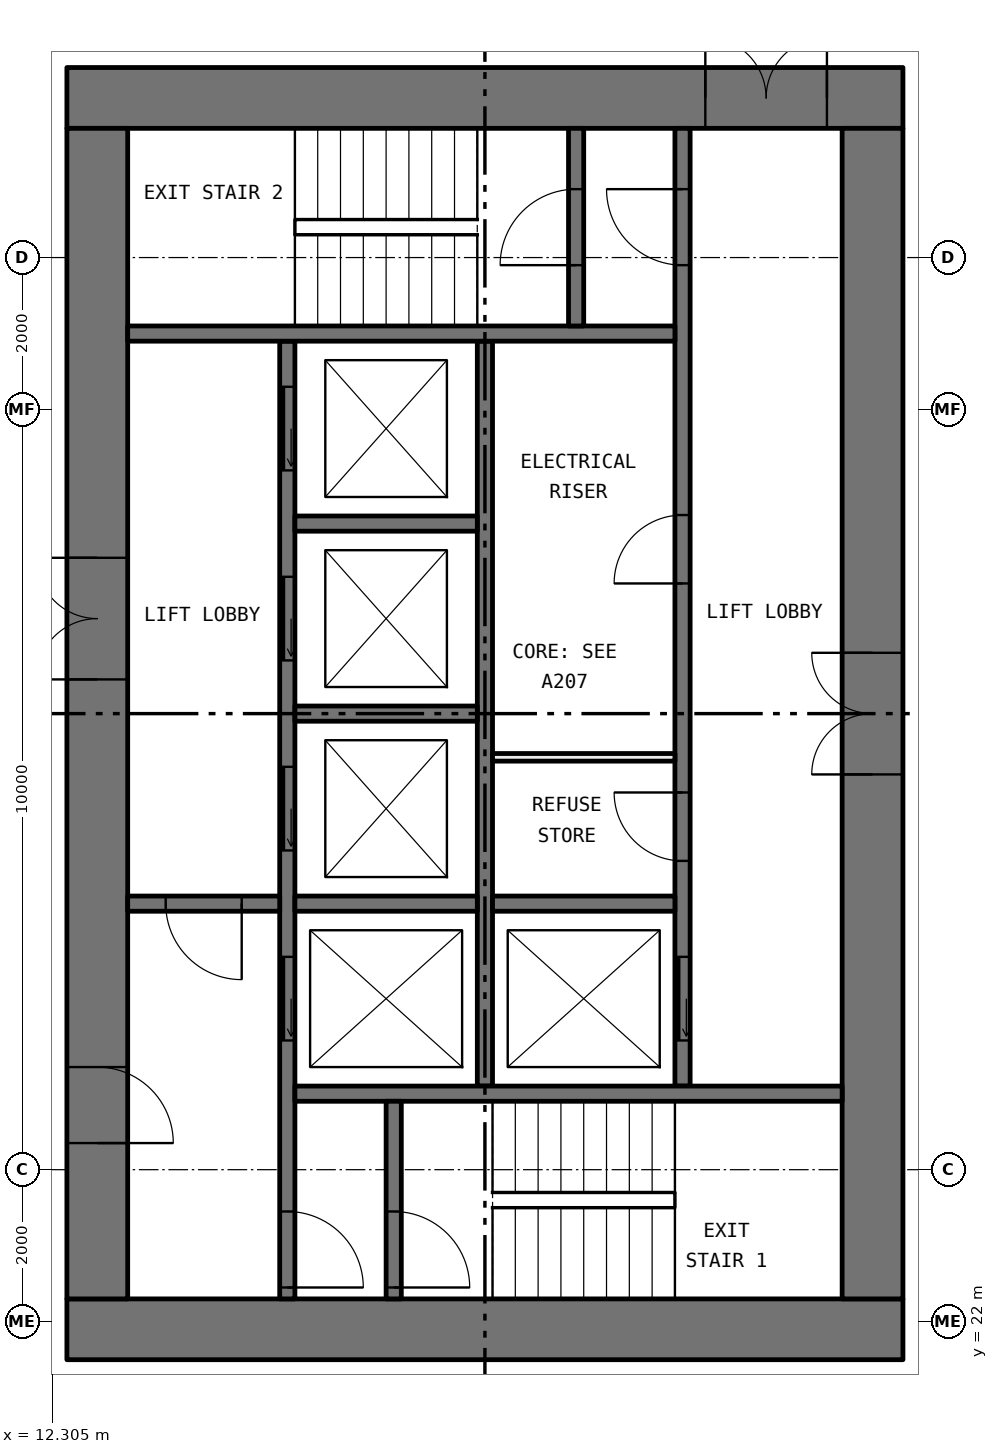
"""IFC4 building model, lengths in metres.
Left out: names, types, materials, properties, quantities, classifications, styles, units other than length and angle.
Written with IfcOpenShell. Run it as: python <this file> out.ifc"""

import sys

from ifc_helpers import new_model, si_unit, direction, frame, frame_2d, origin, place, context, subcontext, project, spatial, rectangle, extrude, element, fill, save


model = new_model("IFC4")
c1 = context("Model", 3, precision=1e-05, world=origin(), true_north=direction((0.0, 1.0)))
c2 = subcontext(c1, "Body", "Model", "MODEL_VIEW")
j1 = project(units=[si_unit("LENGTHUNIT", "METRE"), si_unit("PLANEANGLEUNIT", "RADIAN")], contexts=[c1])
p1 = place(None, origin())
s1 = spatial("IfcSite", under=j1, at=p1, CompositionType="ELEMENT")
p2 = place(p1, origin())
s2 = spatial("IfcBuilding", under=s1, at=p2, CompositionType="ELEMENT")
p3 = place(p2, frame((0.0, 0.0, 33.45)))
s3 = spatial("IfcBuildingStorey", under=s2, at=p3, CompositionType="ELEMENT", Elevation=33.45)
p4 = place(p3, frame((12.5, 21.9, 0.0), z_axis=(0.0, 0.0, 1.0), x_axis=(1.0, 0.0, 0.0)))
e1 = element("IfcWall", 1, at=p4, inside=s3, PredefinedType="SHEAR", context=c2, shape_type="SweptSolid", body=[
    extrude(rectangle(XDim=11.0, YDim=0.8, at=frame_2d((5.5, 0.0))), origin(), (0.0, 0.0, 1.0), 3.05),
])
p5 = place(p3, frame((12.5, 38.1, 0.0), z_axis=(0.0, 0.0, 1.0), x_axis=(1.0, 0.0, 0.0)))
e2 = element("IfcWall", 2, at=p5, inside=s3, PredefinedType="SHEAR", context=c2, shape_type="SweptSolid", body=[
    extrude(rectangle(XDim=11.0, YDim=0.8, at=frame_2d((5.5, 0.0))), origin(), (0.0, 0.0, 1.0), 3.05),
])
p6 = place(p5, frame((8.4, 0.0, 0.0)))
e3 = element("IfcOpeningElement", 3, at=p6, cuts=e2, PredefinedType="OPENING", context=c2, shape_type="SweptSolid", body=[
    extrude(rectangle(XDim=1.6, YDim=2.1, at=frame_2d((0.8, 1.05))), frame((0.0, 0.41, 0.0), z_axis=(0.0, -1.0, 0.0), x_axis=(1.0, 0.0, 0.0)), (0.0, 0.0, 1.0), 0.82),
])
p7 = place(p3, frame((12.9, 22.3, 0.0), z_axis=(0.0, 0.0, 1.0), x_axis=(0.0, 1.0, 0.0)))
e4 = element("IfcWall", 4, at=p7, inside=s3, PredefinedType="SHEAR", context=c2, shape_type="SweptSolid", body=[
    extrude(rectangle(XDim=15.4, YDim=0.8, at=frame_2d((7.7, 0.0))), origin(), (0.0, 0.0, 1.0), 3.05),
])
p8 = place(p7, frame((8.15, 0.0, 0.0)))
e5 = element("IfcOpeningElement", 5, at=p8, cuts=e4, PredefinedType="OPENING", context=c2, shape_type="SweptSolid", body=[
    extrude(rectangle(XDim=1.6, YDim=2.1, at=frame_2d((0.8, 1.05))), frame((0.0, 0.41, 0.0), z_axis=(0.0, -1.0, 0.0), x_axis=(1.0, 0.0, 0.0)), (0.0, 0.0, 1.0), 0.82),
])
p9 = place(p7, frame((2.05, 0.0, 0.0)))
e6 = element("IfcOpeningElement", 6, at=p9, cuts=e4, PredefinedType="OPENING", context=c2, shape_type="SweptSolid", body=[
    extrude(rectangle(XDim=1.0, YDim=2.1, at=frame_2d((0.5, 1.05))), frame((0.0, 0.41, 0.0), z_axis=(0.0, -1.0, 0.0), x_axis=(1.0, 0.0, 0.0)), (0.0, 0.0, 1.0), 0.82),
])
p10 = place(p3, frame((23.1, 22.3, 0.0), z_axis=(0.0, 0.0, 1.0), x_axis=(0.0, 1.0, 0.0)))
e7 = element("IfcWall", 7, at=p10, inside=s3, PredefinedType="SHEAR", context=c2, shape_type="SweptSolid", body=[
    extrude(rectangle(XDim=15.4, YDim=0.8, at=frame_2d((7.7, 0.0))), origin(), (0.0, 0.0, 1.0), 3.05),
])
p11 = place(p10, frame((6.9, 0.0, 0.0)))
e8 = element("IfcOpeningElement", 8, at=p11, cuts=e7, PredefinedType="OPENING", context=c2, shape_type="SweptSolid", body=[
    extrude(rectangle(XDim=1.6, YDim=2.1, at=frame_2d((0.8, 1.05))), frame((0.0, 0.41, 0.0), z_axis=(0.0, -1.0, 0.0), x_axis=(1.0, 0.0, 0.0)), (0.0, 0.0, 1.0), 0.82),
])
p12 = place(p3, frame((15.4, 22.3, 0.0), z_axis=(0.0, 0.0, 1.0), x_axis=(0.0, 1.0, 0.0)))
e9 = element("IfcWall", 9, at=p12, inside=s3, PredefinedType="SOLIDWALL", context=c2, shape_type="SweptSolid", body=[
    extrude(rectangle(XDim=12.6, YDim=0.2, at=frame_2d((6.3, 0.0))), origin(), (0.0, 0.0, 1.0), 3.05),
])
p13 = place(p12, frame((3.4, 0.0, 0.0)))
e10 = element("IfcOpeningElement", 10, at=p13, cuts=e9, PredefinedType="OPENING", context=c2, shape_type="SweptSolid", body=[
    extrude(rectangle(XDim=1.1, YDim=2.1, at=frame_2d((0.55, 1.05))), frame((0.0, 0.11, 0.0), z_axis=(0.0, -1.0, 0.0), x_axis=(1.0, 0.0, 0.0)), (0.0, 0.0, 1.0), 0.22),
])
p14 = place(p12, frame((5.9, 0.0, 0.0)))
e11 = element("IfcOpeningElement", 11, at=p14, cuts=e9, PredefinedType="OPENING", context=c2, shape_type="SweptSolid", body=[
    extrude(rectangle(XDim=1.1, YDim=2.1, at=frame_2d((0.55, 1.05))), frame((0.0, 0.11, 0.0), z_axis=(0.0, -1.0, 0.0), x_axis=(1.0, 0.0, 0.0)), (0.0, 0.0, 1.0), 0.22),
])
p15 = place(p12, frame((8.4, 0.0, 0.0)))
e12 = element("IfcOpeningElement", 12, at=p15, cuts=e9, PredefinedType="OPENING", context=c2, shape_type="SweptSolid", body=[
    extrude(rectangle(XDim=1.1, YDim=2.1, at=frame_2d((0.55, 1.05))), frame((0.0, 0.11, 0.0), z_axis=(0.0, -1.0, 0.0), x_axis=(1.0, 0.0, 0.0)), (0.0, 0.0, 1.0), 0.22),
])
p16 = place(p12, frame((10.9, 0.0, 0.0)))
e13 = element("IfcOpeningElement", 13, at=p16, cuts=e9, PredefinedType="OPENING", context=c2, shape_type="SweptSolid", body=[
    extrude(rectangle(XDim=1.1, YDim=2.1, at=frame_2d((0.55, 1.05))), frame((0.0, 0.11, 0.0), z_axis=(0.0, -1.0, 0.0), x_axis=(1.0, 0.0, 0.0)), (0.0, 0.0, 1.0), 0.22),
])
p17 = place(p12, frame((0.15, 0.0, 0.0)))
e14 = element("IfcOpeningElement", 14, at=p17, cuts=e9, PredefinedType="OPENING", context=c2, shape_type="SweptSolid", body=[
    extrude(rectangle(XDim=1.0, YDim=2.1, at=frame_2d((0.5, 1.05))), frame((0.0, 0.11, 0.0), z_axis=(0.0, -1.0, 0.0), x_axis=(1.0, 0.0, 0.0)), (0.0, 0.0, 1.0), 0.22),
])
p18 = place(p3, frame((20.6, 25.1, 0.0), z_axis=(0.0, 0.0, 1.0), x_axis=(0.0, 1.0, 0.0)))
e15 = element("IfcWall", 15, at=p18, inside=s3, PredefinedType="SOLIDWALL", context=c2, shape_type="SweptSolid", body=[
    extrude(rectangle(XDim=12.6, YDim=0.2, at=frame_2d((6.3, 0.0))), origin(), (0.0, 0.0, 1.0), 3.05),
])
p19 = place(p18, frame((0.6, 0.0, 0.0)))
e16 = element("IfcOpeningElement", 16, at=p19, cuts=e15, PredefinedType="OPENING", context=c2, shape_type="SweptSolid", body=[
    extrude(rectangle(XDim=1.1, YDim=2.1, at=frame_2d((0.55, 1.05))), frame((0.0, 0.11, 0.0), z_axis=(0.0, -1.0, 0.0), x_axis=(1.0, 0.0, 0.0)), (0.0, 0.0, 1.0), 0.22),
])
p20 = place(p18, frame((10.8, 0.0, 0.0)))
e17 = element("IfcOpeningElement", 17, at=p20, cuts=e15, PredefinedType="OPENING", context=c2, shape_type="SweptSolid", body=[
    extrude(rectangle(XDim=1.0, YDim=2.1, at=frame_2d((0.5, 1.05))), frame((0.0, 0.11, 0.0), z_axis=(0.0, -1.0, 0.0), x_axis=(1.0, 0.0, 0.0)), (0.0, 0.0, 1.0), 0.22),
])
p21 = place(p18, frame((2.962, 0.0, 0.0)))
e18 = element("IfcOpeningElement", 18, at=p21, cuts=e15, PredefinedType="OPENING", context=c2, shape_type="SweptSolid", body=[
    extrude(rectangle(XDim=0.9, YDim=2.1, at=frame_2d((0.45, 1.05))), frame((0.0, 0.11, 0.0), z_axis=(0.0, -1.0, 0.0), x_axis=(1.0, 0.0, 0.0)), (0.0, 0.0, 1.0), 0.22),
])
p22 = place(p18, frame((6.613, 0.0, 0.0)))
e19 = element("IfcOpeningElement", 19, at=p22, cuts=e15, PredefinedType="OPENING", context=c2, shape_type="SweptSolid", body=[
    extrude(rectangle(XDim=0.9, YDim=2.1, at=frame_2d((0.45, 1.05))), frame((0.0, 0.11, 0.0), z_axis=(0.0, -1.0, 0.0), x_axis=(1.0, 0.0, 0.0)), (0.0, 0.0, 1.0), 0.22),
])
p23 = place(p3, frame((18.0, 25.1, 0.0), z_axis=(0.0, 0.0, 1.0), x_axis=(0.0, 1.0, 0.0)))
e20 = element("IfcWall", 20, at=p23, inside=s3, PredefinedType="SOLIDWALL", context=c2, shape_type="SweptSolid", body=[
    extrude(rectangle(XDim=9.8, YDim=0.2, at=frame_2d((4.9, 0.0))), origin(), (0.0, 0.0, 1.0), 3.05),
])
for number, where, z_axis, x_axis in (
    (21, (15.5, 25.0, 0.0), (0.0, 0.0, 1.0), (1.0, 0.0, 0.0)),
    (22, (13.3, 35.0, 0.0), (0.0, 0.0, 1.0), (1.0, 0.0, 0.0)),
):
    element("IfcWall", number, at=place(p3, frame(where, z_axis=z_axis, x_axis=x_axis)), inside=s3, PredefinedType="SOLIDWALL", context=c2, shape_type="SweptSolid", body=[
        extrude(rectangle(XDim=7.2, YDim=0.2, at=frame_2d((3.6, 0.0))), origin(), (0.0, 0.0, 1.0), 3.05),
    ])
p24 = place(p3, frame((13.3, 27.5, 0.0), z_axis=(0.0, 0.0, 1.0), x_axis=(1.0, 0.0, 0.0)))
e23 = element("IfcWall", 23, at=p24, inside=s3, PredefinedType="SOLIDWALL", context=c2, shape_type="SweptSolid", body=[
    extrude(rectangle(XDim=2.0, YDim=0.2, at=frame_2d((1.0, 0.0))), origin(), (0.0, 0.0, 1.0), 3.05),
])
p25 = place(p24, frame((0.5, 0.0, 0.0)))
e24 = element("IfcOpeningElement", 24, at=p25, cuts=e23, PredefinedType="OPENING", context=c2, shape_type="SweptSolid", body=[
    extrude(rectangle(XDim=1.0, YDim=2.1, at=frame_2d((0.5, 1.05))), frame((0.0, 0.11, 0.0), z_axis=(0.0, -1.0, 0.0), x_axis=(1.0, 0.0, 0.0)), (0.0, 0.0, 1.0), 0.22),
])
p26 = place(p3, frame((16.8, 22.3, 0.0), z_axis=(0.0, 0.0, 1.0), x_axis=(0.0, 1.0, 0.0)))
e25 = element("IfcWall", 25, at=p26, inside=s3, PredefinedType="SOLIDWALL", context=c2, shape_type="SweptSolid", body=[
    extrude(rectangle(XDim=2.6, YDim=0.2, at=frame_2d((1.3, 0.0))), origin(), (0.0, 0.0, 1.0), 3.05),
])
p27 = place(p26, frame((0.15, 0.0, 0.0)))
e26 = element("IfcOpeningElement", 26, at=p27, cuts=e25, PredefinedType="OPENING", context=c2, shape_type="SweptSolid", body=[
    extrude(rectangle(XDim=1.0, YDim=2.1, at=frame_2d((0.5, 1.05))), frame((0.0, 0.11, 0.0), z_axis=(0.0, -1.0, 0.0), x_axis=(1.0, 0.0, 0.0)), (0.0, 0.0, 1.0), 0.22),
])
p28 = place(p3, frame((19.2, 35.1, 0.0), z_axis=(0.0, 0.0, 1.0), x_axis=(0.0, 1.0, 0.0)))
e27 = element("IfcWall", 27, at=p28, inside=s3, PredefinedType="SOLIDWALL", context=c2, shape_type="SweptSolid", body=[
    extrude(rectangle(XDim=2.6, YDim=0.2, at=frame_2d((1.3, 0.0))), origin(), (0.0, 0.0, 1.0), 3.05),
])
p29 = place(p28, frame((0.8, 0.0, 0.0)))
e28 = element("IfcOpeningElement", 28, at=p29, cuts=e27, PredefinedType="OPENING", context=c2, shape_type="SweptSolid", body=[
    extrude(rectangle(XDim=1.0, YDim=2.1, at=frame_2d((0.5, 1.05))), frame((0.0, 0.11, 0.0), z_axis=(0.0, -1.0, 0.0), x_axis=(1.0, 0.0, 0.0)), (0.0, 0.0, 1.0), 0.22),
])
for number, where, z_axis, x_axis in (
    (29, (15.5, 27.5, 0.0), (0.0, 0.0, 1.0), (1.0, 0.0, 0.0)),
    (30, (15.5, 30.0, 0.0), (0.0, 0.0, 1.0), (1.0, 0.0, 0.0)),
    (31, (15.5, 32.5, 0.0), (0.0, 0.0, 1.0), (1.0, 0.0, 0.0)),
    (32, (18.1, 27.5, 0.0), (0.0, 0.0, 1.0), (1.0, 0.0, 0.0)),
):
    element("IfcWall", number, at=place(p3, frame(where, z_axis=z_axis, x_axis=x_axis)), inside=s3, PredefinedType="SOLIDWALL", context=c2, shape_type="SweptSolid", body=[
        extrude(rectangle(XDim=2.4, YDim=0.2, at=frame_2d((1.2, 0.0))), origin(), (0.0, 0.0, 1.0), 3.05),
    ])
p30 = place(p3, frame((18.1, 29.425, 0.0), z_axis=(0.0, 0.0, 1.0), x_axis=(1.0, 0.0, 0.0)))
e33 = element("IfcWall", 33, at=p30, inside=s3, PredefinedType="PARTITIONING", context=c2, shape_type="SweptSolid", body=[
    extrude(rectangle(XDim=2.4, YDim=0.1, at=frame_2d((1.2, 0.0))), origin(), (0.0, 0.0, 1.0), 3.05),
])
p31 = place(p19, origin())
e34 = element("IfcDoor", 34, at=p31, inside=s3, OperationType="SLIDING_TO_LEFT", PredefinedType="DOOR", context=c2, shape_type="SweptSolid", body=[
    extrude(rectangle(XDim=1.1, YDim=2.1, at=frame_2d((0.55, 1.05))), frame((0.0, 0.025, 0.0), z_axis=(0.0, -1.0, 0.0), x_axis=(1.0, 0.0, 0.0)), (0.0, 0.0, 1.0), 0.05),
])
fill(e16, e34)
p32 = place(p13, origin())
e35 = element("IfcDoor", 35, at=p32, inside=s3, OperationType="SLIDING_TO_LEFT", PredefinedType="DOOR", context=c2, shape_type="SweptSolid", body=[
    extrude(rectangle(XDim=1.1, YDim=2.1, at=frame_2d((0.55, 1.05))), frame((0.0, 0.025, 0.0), z_axis=(0.0, -1.0, 0.0), x_axis=(1.0, 0.0, 0.0)), (0.0, 0.0, 1.0), 0.05),
])
fill(e10, e35)
p33 = place(p14, origin())
e36 = element("IfcDoor", 36, at=p33, inside=s3, OperationType="SLIDING_TO_LEFT", PredefinedType="DOOR", context=c2, shape_type="SweptSolid", body=[
    extrude(rectangle(XDim=1.1, YDim=2.1, at=frame_2d((0.55, 1.05))), frame((0.0, 0.025, 0.0), z_axis=(0.0, -1.0, 0.0), x_axis=(1.0, 0.0, 0.0)), (0.0, 0.0, 1.0), 0.05),
])
fill(e11, e36)
p34 = place(p15, origin())
e37 = element("IfcDoor", 37, at=p34, inside=s3, OperationType="SLIDING_TO_LEFT", PredefinedType="DOOR", context=c2, shape_type="SweptSolid", body=[
    extrude(rectangle(XDim=1.1, YDim=2.1, at=frame_2d((0.55, 1.05))), frame((0.0, 0.025, 0.0), z_axis=(0.0, -1.0, 0.0), x_axis=(1.0, 0.0, 0.0)), (0.0, 0.0, 1.0), 0.05),
])
fill(e12, e37)
p35 = place(p16, origin())
e38 = element("IfcDoor", 38, at=p35, inside=s3, OperationType="SLIDING_TO_LEFT", PredefinedType="DOOR", context=c2, shape_type="SweptSolid", body=[
    extrude(rectangle(XDim=1.1, YDim=2.1, at=frame_2d((0.55, 1.05))), frame((0.0, 0.025, 0.0), z_axis=(0.0, -1.0, 0.0), x_axis=(1.0, 0.0, 0.0)), (0.0, 0.0, 1.0), 0.05),
])
fill(e13, e38)
p36 = place(p27, frame((1.0, 0.0, 0.0), x_axis=(-1.0, 0.0, 0.0)))
e39 = element("IfcDoor", 39, at=p36, inside=s3, OperationType="SINGLE_SWING_LEFT", PredefinedType="DOOR", context=c2, shape_type="SweptSolid", body=[
    extrude(rectangle(XDim=1.0, YDim=2.1, at=frame_2d((0.5, 1.05))), frame((0.0, 0.025, 0.0), z_axis=(0.0, -1.0, 0.0), x_axis=(1.0, 0.0, 0.0)), (0.0, 0.0, 1.0), 0.05),
])
fill(e26, e39)
p37 = place(p17, frame((1.0, 0.0, 0.0), x_axis=(-1.0, 0.0, 0.0)))
e40 = element("IfcDoor", 40, at=p37, inside=s3, OperationType="SINGLE_SWING_LEFT", PredefinedType="DOOR", context=c2, shape_type="SweptSolid", body=[
    extrude(rectangle(XDim=1.0, YDim=2.1, at=frame_2d((0.5, 1.05))), frame((0.0, 0.025, 0.0), z_axis=(0.0, -1.0, 0.0), x_axis=(1.0, 0.0, 0.0)), (0.0, 0.0, 1.0), 0.05),
])
fill(e14, e40)
p38 = place(p20, origin())
e41 = element("IfcDoor", 41, at=p38, inside=s3, OperationType="SINGLE_SWING_LEFT", PredefinedType="DOOR", context=c2, shape_type="SweptSolid", body=[
    extrude(rectangle(XDim=1.0, YDim=2.1, at=frame_2d((0.5, 1.05))), frame((0.0, 0.025, 0.0), z_axis=(0.0, -1.0, 0.0), x_axis=(1.0, 0.0, 0.0)), (0.0, 0.0, 1.0), 0.05),
])
fill(e17, e41)
p39 = place(p29, origin())
e42 = element("IfcDoor", 42, at=p39, inside=s3, OperationType="SINGLE_SWING_RIGHT", PredefinedType="DOOR", context=c2, shape_type="SweptSolid", body=[
    extrude(rectangle(XDim=1.0, YDim=2.1, at=frame_2d((0.5, 1.05))), frame((0.0, 0.025, 0.0), z_axis=(0.0, -1.0, 0.0), x_axis=(1.0, 0.0, 0.0)), (0.0, 0.0, 1.0), 0.05),
])
fill(e28, e42)
p40 = place(p25, frame((1.0, 0.0, 0.0), x_axis=(-1.0, 0.0, 0.0)))
e43 = element("IfcDoor", 43, at=p40, inside=s3, OperationType="SINGLE_SWING_RIGHT", PredefinedType="DOOR", context=c2, shape_type="SweptSolid", body=[
    extrude(rectangle(XDim=1.0, YDim=2.1, at=frame_2d((0.5, 1.05))), frame((0.0, 0.025, 0.0), z_axis=(0.0, -1.0, 0.0), x_axis=(1.0, 0.0, 0.0)), (0.0, 0.0, 1.0), 0.05),
])
fill(e24, e43)
p41 = place(p8, origin())
e44 = element("IfcDoor", 44, at=p41, inside=s3, OperationType="DOUBLE_DOOR_SINGLE_SWING", PredefinedType="DOOR", context=c2, shape_type="SweptSolid", body=[
    extrude(rectangle(XDim=1.6, YDim=2.1, at=frame_2d((0.8, 1.05))), frame((0.0, 0.025, 0.0), z_axis=(0.0, -1.0, 0.0), x_axis=(1.0, 0.0, 0.0)), (0.0, 0.0, 1.0), 0.05),
])
fill(e5, e44)
p42 = place(p9, frame((1.0, 0.0, 0.0), x_axis=(-1.0, 0.0, 0.0)))
e45 = element("IfcDoor", 45, at=p42, inside=s3, OperationType="SINGLE_SWING_LEFT", PredefinedType="DOOR", context=c2, shape_type="SweptSolid", body=[
    extrude(rectangle(XDim=1.0, YDim=2.1, at=frame_2d((0.5, 1.05))), frame((0.0, 0.025, 0.0), z_axis=(0.0, -1.0, 0.0), x_axis=(1.0, 0.0, 0.0)), (0.0, 0.0, 1.0), 0.05),
])
fill(e6, e45)
p43 = place(p6, origin())
e46 = element("IfcDoor", 46, at=p43, inside=s3, OperationType="DOUBLE_DOOR_SINGLE_SWING", PredefinedType="DOOR", context=c2, shape_type="SweptSolid", body=[
    extrude(rectangle(XDim=1.6, YDim=2.1, at=frame_2d((0.8, 1.05))), frame((0.0, 0.025, 0.0), z_axis=(0.0, -1.0, 0.0), x_axis=(1.0, 0.0, 0.0)), (0.0, 0.0, 1.0), 0.05),
])
fill(e3, e46)
p44 = place(p11, origin())
e47 = element("IfcDoor", 47, at=p44, inside=s3, OperationType="DOUBLE_DOOR_SINGLE_SWING", PredefinedType="DOOR", context=c2, shape_type="SweptSolid", body=[
    extrude(rectangle(XDim=1.6, YDim=2.1, at=frame_2d((0.8, 1.05))), frame((0.0, 0.025, 0.0), z_axis=(0.0, -1.0, 0.0), x_axis=(1.0, 0.0, 0.0)), (0.0, 0.0, 1.0), 0.05),
])
fill(e8, e47)
p45 = place(p21, origin())
e48 = element("IfcDoor", 48, at=p45, inside=s3, OperationType="SINGLE_SWING_LEFT", PredefinedType="DOOR", context=c2, shape_type="SweptSolid", body=[
    extrude(rectangle(XDim=0.9, YDim=2.1, at=frame_2d((0.45, 1.05))), frame((0.0, 0.025, 0.0), z_axis=(0.0, -1.0, 0.0), x_axis=(1.0, 0.0, 0.0)), (0.0, 0.0, 1.0), 0.05),
])
fill(e18, e48)
p46 = place(p22, origin())
e49 = element("IfcDoor", 49, at=p46, inside=s3, OperationType="SINGLE_SWING_RIGHT", PredefinedType="DOOR", context=c2, shape_type="SweptSolid", body=[
    extrude(rectangle(XDim=0.9, YDim=2.1, at=frame_2d((0.45, 1.05))), frame((0.0, 0.025, 0.0), z_axis=(0.0, -1.0, 0.0), x_axis=(1.0, 0.0, 0.0)), (0.0, 0.0, 1.0), 0.05),
])
fill(e19, e49)
save(model, sys.argv[1])
